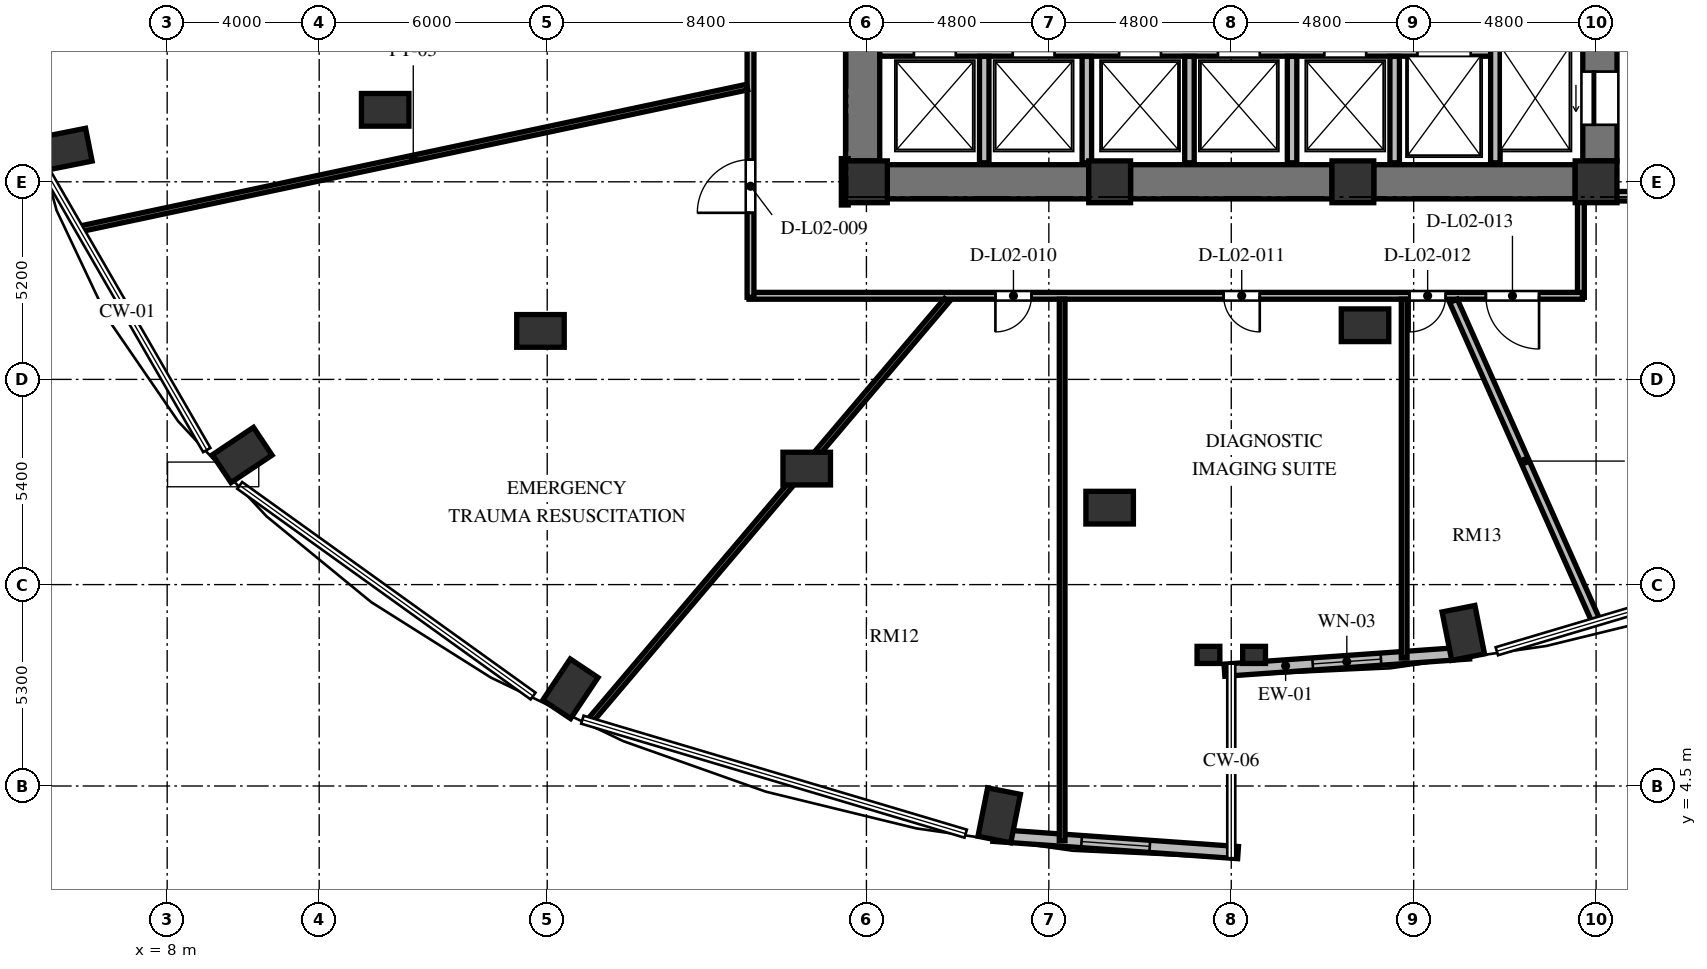
"""IFC4 building model, lengths in metres.
Left out: names, types, materials, properties, quantities, classifications, styles, units other than length and angle.
Written with IfcOpenShell. Run it as: python <this file> out.ifc"""

import sys

from ifc_helpers import new_model, si_unit, direction, frame, frame_2d, origin, origin_2d, place, context, subcontext, project, spatial, rectangle, extrude, element, fill, save


model = new_model("IFC4")
c1 = context("Model", 3, precision=1e-05, world=origin(), true_north=direction((0.0, 1.0)))
c2 = subcontext(c1, "Body", "Model", "MODEL_VIEW")
j1 = project(units=[si_unit("LENGTHUNIT", "METRE"), si_unit("PLANEANGLEUNIT", "RADIAN")], contexts=[c1])
p1 = place(None, origin())
s1 = spatial("IfcSite", under=j1, at=p1, CompositionType="ELEMENT")
p2 = place(p1, origin())
s2 = spatial("IfcBuilding", under=s1, at=p2, CompositionType="ELEMENT")
p3 = place(p2, frame((0.0, 0.0, 10.8)))
s3 = spatial("IfcBuildingStorey", under=s2, at=p3, CompositionType="ELEMENT", Elevation=10.8)
for number, where, z_axis, x_axis in (
    (1, (42.106, 8.529, 0.0), (0.0, 0.0, 1.0), (0.195, -0.981, 0.0)),
    (2, (5.302, 21.25, 0.0), (0.0, 0.0, 1.0), (-0.981, -0.195, 0.0)),
    (3, (9.975, 13.211, 0.0), (0.0, 0.0, 1.0), (-0.831, -0.556, 0.0)),
    (4, (18.611, 7.058, 0.0), (0.0, 0.0, 1.0), (-0.556, -0.831, 0.0)),
    (5, (29.894, 3.729, 0.0), (0.0, 0.0, 1.0), (-0.195, -0.981, 0.0)),
):
    element("IfcColumn", number, at=place(p3, frame(where, z_axis=z_axis, x_axis=x_axis)), inside=s3, PredefinedType="COLUMN", context=c2, shape_type="SweptSolid", body=[
        extrude(rectangle(XDim=1.3, YDim=0.88, at=origin_2d()), origin(), (0.0, 0.0, 1.0), 4.8),
    ])
for number, where, z_axis, x_axis in (
    (6, (26.4, 20.4, 0.0), (0.0, 0.0, 1.0), (1.0, 0.0, 0.0)),
    (7, (32.8, 20.4, 0.0), (0.0, 0.0, 1.0), (1.0, 0.0, 0.0)),
    (8, (39.2, 20.4, 0.0), (0.0, 0.0, 1.0), (1.0, 0.0, 0.0)),
    (9, (45.6, 20.4, 0.0), (0.0, 0.0, 1.0), (1.0, 0.0, 0.0)),
):
    element("IfcColumn", number, at=place(p3, frame(where, z_axis=z_axis, x_axis=x_axis)), inside=s3, PredefinedType="COLUMN", context=c2, shape_type="SweptSolid", body=[
        extrude(rectangle(XDim=1.1, YDim=1.1, at=origin_2d()), origin(), (0.0, 0.0, 1.0), 4.8),
    ])
for number, where, z_axis, x_axis in (
    (10, (39.52, 16.625, 0.0), (0.0, 0.0, 1.0), (1.0, 0.0, 0.0)),
    (11, (13.737, 22.294, 0.0), (0.0, 0.0, 1.0), (1.0, 0.0, 0.0)),
    (12, (17.823, 16.476, 0.0), (0.0, 0.0, 1.0), (1.0, 0.0, 0.0)),
    (13, (24.829, 12.853, 0.0), (0.0, 0.0, 1.0), (1.0, 0.0, 0.0)),
    (14, (32.8, 11.825, 0.0), (0.0, 0.0, 1.0), (1.0, 0.0, 0.0)),
):
    element("IfcColumn", number, at=place(p3, frame(where, z_axis=z_axis, x_axis=x_axis)), inside=s3, PredefinedType="COLUMN", context=c2, shape_type="SweptSolid", body=[
        extrude(rectangle(XDim=1.25, YDim=0.86, at=origin_2d()), origin(), (0.0, 0.0, 1.0), 4.8),
    ])
for number, where, z_axis, x_axis in (
    (15, (35.4, 7.95, 0.0), (0.0, 0.0, 1.0), (1.0, 0.0, 0.0)),
    (16, (36.6, 7.95, 0.0), (0.0, 0.0, 1.0), (1.0, 0.0, 0.0)),
):
    element("IfcColumn", number, at=place(p3, frame(where, z_axis=z_axis, x_axis=x_axis)), inside=s3, PredefinedType="PILASTER", context=c2, shape_type="SweptSolid", body=[
        extrude(rectangle(XDim=0.6, YDim=0.45, at=origin_2d()), origin(), (0.0, 0.0, 1.0), 4.8),
    ])
p4 = place(p3, frame((26.3, 20.95, 0.0), z_axis=(0.0, 0.0, 1.0), x_axis=(0.0, 1.0, 0.0)))
e17 = element("IfcWall", 17, at=p4, inside=s3, PredefinedType="SHEAR", context=c2, shape_type="SweptSolid", body=[
    extrude(rectangle(XDim=14.1, YDim=0.9, at=frame_2d((7.05, 0.0))), origin(), (0.0, 0.0, 1.0), 4.8),
])
p5 = place(p4, frame((6.5, 0.0, 0.0)))
e18 = element("IfcOpeningElement", 18, at=p5, cuts=e17, PredefinedType="OPENING", context=c2, shape_type="SweptSolid", body=[
    extrude(rectangle(XDim=1.2, YDim=2.15, at=frame_2d((0.6, 1.075))), frame((0.0, 0.46, 0.0), z_axis=(0.0, -1.0, 0.0), x_axis=(1.0, 0.0, 0.0)), (0.0, 0.0, 1.0), 0.92),
])
p6 = place(p4, frame((9.6, 0.0, 0.0)))
e19 = element("IfcOpeningElement", 19, at=p6, cuts=e17, PredefinedType="OPENING", context=c2, shape_type="SweptSolid", body=[
    extrude(rectangle(XDim=1.3, YDim=2.2, at=frame_2d((0.65, 1.1))), frame((0.0, 0.46, 0.0), z_axis=(0.0, -1.0, 0.0), x_axis=(1.0, 0.0, 0.0)), (0.0, 0.0, 1.0), 0.92),
])
p7 = place(p4, frame((3.26, 0.0, 0.0)))
e20 = element("IfcOpeningElement", 20, at=p7, cuts=e17, PredefinedType="OPENING", context=c2, shape_type="SweptSolid", body=[
    extrude(rectangle(XDim=1.3, YDim=2.2, at=frame_2d((0.65, 1.1))), frame((0.0, 0.46, 0.0), z_axis=(0.0, -1.0, 0.0), x_axis=(1.0, 0.0, 0.0)), (0.0, 0.0, 1.0), 0.92),
])
p8 = place(p3, frame((45.7, 20.95, 0.0), z_axis=(0.0, 0.0, 1.0), x_axis=(0.0, 1.0, 0.0)))
e21 = element("IfcWall", 21, at=p8, inside=s3, PredefinedType="SHEAR", context=c2, shape_type="SweptSolid", body=[
    extrude(rectangle(XDim=14.1, YDim=0.9, at=frame_2d((7.05, 0.0))), origin(), (0.0, 0.0, 1.0), 4.8),
])
p9 = place(p8, frame((11.75, 0.0, 0.0)))
e22 = element("IfcOpeningElement", 22, at=p9, cuts=e21, PredefinedType="OPENING", context=c2, shape_type="SweptSolid", body=[
    extrude(rectangle(XDim=1.4, YDim=2.3, at=frame_2d((0.7, 1.15))), frame((0.0, 0.46, 0.0), z_axis=(0.0, -1.0, 0.0), x_axis=(1.0, 0.0, 0.0)), (0.0, 0.0, 1.0), 0.92),
])
p10 = place(p8, frame((0.95, 0.0, 0.0)))
e23 = element("IfcOpeningElement", 23, at=p10, cuts=e21, PredefinedType="OPENING", context=c2, shape_type="SweptSolid", body=[
    extrude(rectangle(XDim=1.4, YDim=2.3, at=frame_2d((0.7, 1.15))), frame((0.0, 0.46, 0.0), z_axis=(0.0, -1.0, 0.0), x_axis=(1.0, 0.0, 0.0)), (0.0, 0.0, 1.0), 0.92),
])
p11 = place(p3, frame((26.95, 20.4, 0.0), z_axis=(0.0, 0.0, 1.0), x_axis=(1.0, 0.0, 0.0)))
e24 = element("IfcWall", 24, at=p11, inside=s3, PredefinedType="SHEAR", context=c2, shape_type="SweptSolid", body=[
    extrude(rectangle(XDim=5.3, YDim=0.9, at=frame_2d((2.65, 0.0))), origin(), (0.0, 0.0, 1.0), 4.8),
])
p12 = place(p3, frame((33.35, 20.4, 0.0), z_axis=(0.0, 0.0, 1.0), x_axis=(1.0, 0.0, 0.0)))
e25 = element("IfcWall", 25, at=p12, inside=s3, PredefinedType="SHEAR", context=c2, shape_type="SweptSolid", body=[
    extrude(rectangle(XDim=5.3, YDim=0.9, at=frame_2d((2.65, 0.0))), origin(), (0.0, 0.0, 1.0), 4.8),
])
p13 = place(p3, frame((39.75, 20.4, 0.0), z_axis=(0.0, 0.0, 1.0), x_axis=(1.0, 0.0, 0.0)))
e26 = element("IfcWall", 26, at=p13, inside=s3, PredefinedType="SHEAR", context=c2, shape_type="SweptSolid", body=[
    extrude(rectangle(XDim=5.3, YDim=0.9, at=frame_2d((2.65, 0.0))), origin(), (0.0, 0.0, 1.0), 4.8),
])
p14 = place(p3, frame((35.82, 7.547, 0.0), z_axis=(0.0, 0.0, 1.0), x_axis=(0.99751367159, 0.070473221795, 0.0)))
e27 = element("IfcWall", 27, at=p14, inside=s3, PredefinedType="SOLIDWALL", context=c2, shape_type="SweptSolid", body=[
    extrude(rectangle(XDim=6.458, YDim=0.32, at=frame_2d((3.229, 0.0))), origin(), (0.0, 0.0, 1.0), 4.52),
])
p15 = place(p14, frame((2.329, 0.0, 0.85)))
e28 = element("IfcOpeningElement", 28, at=p15, cuts=e27, PredefinedType="OPENING", context=c2, shape_type="SweptSolid", body=[
    extrude(rectangle(XDim=1.8, YDim=2.4, at=frame_2d((0.9, 1.2))), frame((0.0, 0.17, 0.0), z_axis=(0.0, -1.0, 0.0), x_axis=(1.0, 0.0, 0.0)), (0.0, 0.0, 1.0), 0.34),
])
p16 = place(p3, frame((29.738, 3.202, 0.0), z_axis=(0.0, 0.0, 1.0), x_axis=(0.997513108184, -0.070481196075, 0.0)))
e29 = element("IfcWall", 29, at=p16, inside=s3, PredefinedType="SOLIDWALL", context=c2, shape_type="SweptSolid", body=[
    extrude(rectangle(XDim=6.457, YDim=0.32, at=frame_2d((3.229, 0.0))), origin(), (0.0, 0.0, 1.0), 4.52),
])
p17 = place(p16, frame((2.328, 0.0, 0.85)))
e30 = element("IfcOpeningElement", 30, at=p17, cuts=e29, PredefinedType="OPENING", context=c2, shape_type="SweptSolid", body=[
    extrude(rectangle(XDim=1.8, YDim=2.4, at=frame_2d((0.9, 1.2))), frame((0.0, 0.17, 0.0), z_axis=(0.0, -1.0, 0.0), x_axis=(1.0, 0.0, 0.0)), (0.0, 0.0, 1.0), 0.34),
])
p18 = place(p3, frame((26.75, 23.83, 0.0), z_axis=(0.0, 0.0, 1.0), x_axis=(1.0, 0.0, 0.0)))
e31 = element("IfcWall", 31, at=p18, inside=s3, PredefinedType="SOLIDWALL", context=c2, shape_type="SweptSolid", body=[
    extrude(rectangle(XDim=16.2, YDim=0.25, at=frame_2d((8.1, 0.0))), origin(), (0.0, 0.0, 1.0), 4.52),
])
p19 = place(p18, frame((0.9, 0.0, 0.0)))
e32 = element("IfcOpeningElement", 32, at=p19, cuts=e31, PredefinedType="OPENING", context=c2, shape_type="SweptSolid", body=[
    extrude(rectangle(XDim=1.1, YDim=2.2, at=frame_2d((0.55, 1.1))), frame((0.0, 0.135, 0.0), z_axis=(0.0, -1.0, 0.0), x_axis=(1.0, 0.0, 0.0)), (0.0, 0.0, 1.0), 0.27),
])
p20 = place(p18, frame((3.5, 0.0, 0.0)))
e33 = element("IfcOpeningElement", 33, at=p20, cuts=e31, PredefinedType="OPENING", context=c2, shape_type="SweptSolid", body=[
    extrude(rectangle(XDim=1.1, YDim=2.2, at=frame_2d((0.55, 1.1))), frame((0.0, 0.135, 0.0), z_axis=(0.0, -1.0, 0.0), x_axis=(1.0, 0.0, 0.0)), (0.0, 0.0, 1.0), 0.27),
])
p21 = place(p18, frame((6.3, 0.0, 0.0)))
e34 = element("IfcOpeningElement", 34, at=p21, cuts=e31, PredefinedType="OPENING", context=c2, shape_type="SweptSolid", body=[
    extrude(rectangle(XDim=1.1, YDim=2.2, at=frame_2d((0.55, 1.1))), frame((0.0, 0.135, 0.0), z_axis=(0.0, -1.0, 0.0), x_axis=(1.0, 0.0, 0.0)), (0.0, 0.0, 1.0), 0.27),
])
p22 = place(p18, frame((8.9, 0.0, 0.0)))
e35 = element("IfcOpeningElement", 35, at=p22, cuts=e31, PredefinedType="OPENING", context=c2, shape_type="SweptSolid", body=[
    extrude(rectangle(XDim=1.1, YDim=2.2, at=frame_2d((0.55, 1.1))), frame((0.0, 0.135, 0.0), z_axis=(0.0, -1.0, 0.0), x_axis=(1.0, 0.0, 0.0)), (0.0, 0.0, 1.0), 0.27),
])
p23 = place(p18, frame((11.7, 0.0, 0.0)))
e36 = element("IfcOpeningElement", 36, at=p23, cuts=e31, PredefinedType="OPENING", context=c2, shape_type="SweptSolid", body=[
    extrude(rectangle(XDim=1.1, YDim=2.2, at=frame_2d((0.55, 1.1))), frame((0.0, 0.135, 0.0), z_axis=(0.0, -1.0, 0.0), x_axis=(1.0, 0.0, 0.0)), (0.0, 0.0, 1.0), 0.27),
])
p24 = place(p18, frame((14.15, 0.0, 0.0)))
e37 = element("IfcOpeningElement", 37, at=p24, cuts=e31, PredefinedType="OPENING", context=c2, shape_type="SweptSolid", body=[
    extrude(rectangle(XDim=1.4, YDim=2.3, at=frame_2d((0.7, 1.15))), frame((0.0, 0.135, 0.0), z_axis=(0.0, -1.0, 0.0), x_axis=(1.0, 0.0, 0.0)), (0.0, 0.0, 1.0), 0.27),
])
p25 = place(p3, frame((42.95, 20.9, 0.0), z_axis=(0.0, 0.0, 1.0), x_axis=(0.0, 1.0, 0.0)))
e38 = element("IfcWall", 38, at=p25, inside=s3, PredefinedType="SOLIDWALL", context=c2, shape_type="SweptSolid", body=[
    extrude(rectangle(XDim=3.2, YDim=0.25, at=frame_2d((1.6, 0.0))), origin(), (0.0, 0.0, 1.0), 4.52),
])
for number, where, z_axis, x_axis in (
    (39, (29.5, 20.9, 0.0), (0.0, 0.0, 1.0), (0.0, 1.0, 0.0)),
    (40, (32.2, 20.9, 0.0), (0.0, 0.0, 1.0), (0.0, 1.0, 0.0)),
    (41, (34.9, 20.9, 0.0), (0.0, 0.0, 1.0), (0.0, 1.0, 0.0)),
    (42, (37.6, 20.9, 0.0), (0.0, 0.0, 1.0), (0.0, 1.0, 0.0)),
    (43, (40.3, 20.9, 0.0), (0.0, 0.0, 1.0), (0.0, 1.0, 0.0)),
):
    element("IfcWall", number, at=place(p3, frame(where, z_axis=z_axis, x_axis=x_axis)), inside=s3, PredefinedType="SOLIDWALL", context=c2, shape_type="SweptSolid", body=[
        extrude(rectangle(XDim=2.8, YDim=0.25, at=frame_2d((1.4, 0.0))), origin(), (0.0, 0.0, 1.0), 4.52),
    ])
p26 = place(p3, frame((45.7, 20.02, 0.0), z_axis=(0.0, 0.0, 1.0), x_axis=(1.0, 0.0, 0.0)))
e44 = element("IfcWall", 44, at=p26, inside=s3, PredefinedType="SOLIDWALL", context=c2, shape_type="SweptSolid", body=[
    extrude(rectangle(XDim=4.715, YDim=0.25, at=frame_2d((2.357, 0.0))), origin(), (0.0, 0.0, 1.0), 4.52),
])
p27 = place(p3, frame((25.83, 21.01, 0.0), z_axis=(0.0, 0.0, 1.0), x_axis=(0.0, -1.0, 0.0)))
e45 = element("IfcWall", 45, at=p27, inside=s3, PredefinedType="PARTITIONING", context=c2, shape_type="SweptSolid", body=[
    extrude(rectangle(XDim=1.22, YDim=0.18, at=frame_2d((0.61, 0.0))), origin(), (0.0, 0.0, 1.0), 4.52),
])
p28 = place(p3, frame((45.2, 19.91, 0.0), z_axis=(0.0, 0.0, 1.0), x_axis=(0.0, -1.0, 0.0)))
e46 = element("IfcWall", 46, at=p28, inside=s3, PredefinedType="PARTITIONING", context=c2, shape_type="SweptSolid", body=[
    extrude(rectangle(XDim=2.55, YDim=0.18, at=frame_2d((1.275, 0.0))), origin(), (0.0, 0.0, 1.0), 4.52),
])
p29 = place(p3, frame((45.24, 17.4, 0.0), z_axis=(0.0, 0.0, 1.0), x_axis=(-1.0, 0.0, 0.0)))
e47 = element("IfcWall", 47, at=p29, inside=s3, PredefinedType="PARTITIONING", context=c2, shape_type="SweptSolid", body=[
    extrude(rectangle(XDim=21.93, YDim=0.18, at=frame_2d((10.965, 0.0))), origin(), (0.0, 0.0, 1.0), 4.52),
])
p30 = place(p29, frame((14.496, 0.0, 0.0)))
e48 = element("IfcOpeningElement", 48, at=p30, cuts=e47, PredefinedType="OPENING", context=c2, shape_type="SweptSolid", body=[
    extrude(rectangle(XDim=0.95, YDim=2.1, at=frame_2d((0.475, 1.05))), frame((0.0, 0.1, 0.0), z_axis=(0.0, -1.0, 0.0), x_axis=(1.0, 0.0, 0.0)), (0.0, 0.0, 1.0), 0.2),
])
p31 = place(p29, frame((8.49, 0.0, 0.0)))
e49 = element("IfcOpeningElement", 49, at=p31, cuts=e47, PredefinedType="OPENING", context=c2, shape_type="SweptSolid", body=[
    extrude(rectangle(XDim=0.95, YDim=2.1, at=frame_2d((0.475, 1.05))), frame((0.0, 0.1, 0.0), z_axis=(0.0, -1.0, 0.0), x_axis=(1.0, 0.0, 0.0)), (0.0, 0.0, 1.0), 0.2),
])
p32 = place(p29, frame((3.597, 0.0, 0.0)))
e50 = element("IfcOpeningElement", 50, at=p32, cuts=e47, PredefinedType="OPENING", context=c2, shape_type="SweptSolid", body=[
    extrude(rectangle(XDim=0.95, YDim=2.1, at=frame_2d((0.475, 1.05))), frame((0.0, 0.1, 0.0), z_axis=(0.0, -1.0, 0.0), x_axis=(1.0, 0.0, 0.0)), (0.0, 0.0, 1.0), 0.2),
])
p33 = place(p29, frame((1.141, 0.0, 0.0)))
e51 = element("IfcOpeningElement", 51, at=p33, cuts=e47, PredefinedType="OPENING", context=c2, shape_type="SweptSolid", body=[
    extrude(rectangle(XDim=1.4, YDim=2.2, at=frame_2d((0.7, 1.1))), frame((0.0, 0.1, 0.0), z_axis=(0.0, -1.0, 0.0), x_axis=(1.0, 0.0, 0.0)), (0.0, 0.0, 1.0), 0.2),
])
p34 = place(p3, frame((23.35, 17.36, 0.0), z_axis=(0.0, 0.0, 1.0), x_axis=(0.0, 1.0, 0.0)))
e52 = element("IfcWall", 52, at=p34, inside=s3, PredefinedType="PARTITIONING", context=c2, shape_type="SweptSolid", body=[
    extrude(rectangle(XDim=9.28, YDim=0.18, at=frame_2d((4.64, 0.0))), origin(), (0.0, 0.0, 1.0), 4.52),
])
p35 = place(p34, frame((2.224, 0.0, 0.0)))
e53 = element("IfcOpeningElement", 53, at=p35, cuts=e52, PredefinedType="OPENING", context=c2, shape_type="SweptSolid", body=[
    extrude(rectangle(XDim=1.4, YDim=2.2, at=frame_2d((0.7, 1.1))), frame((0.0, 0.1, 0.0), z_axis=(0.0, -1.0, 0.0), x_axis=(1.0, 0.0, 0.0)), (0.0, 0.0, 1.0), 0.2),
])
p36 = place(p3, frame((41.847, 17.267, 0.0), z_axis=(0.0, 0.0, 1.0), x_axis=(0.406746917765, -0.913540882987, 0.0)))
e54 = element("IfcWall", 54, at=p36, inside=s3, PredefinedType="PARTITIONING", context=c2, shape_type="SweptSolid", body=[
    extrude(rectangle(XDim=9.231, YDim=0.22, at=frame_2d((4.616, 0.0))), origin(), (0.0, 0.0, 1.0), 4.52),
])
p37 = place(p3, frame((23.261, 22.892, 0.0), z_axis=(0.0, 0.0, 1.0), x_axis=(-0.978149523722, -0.207902643662, 0.0)))
e55 = element("IfcWall", 55, at=p37, inside=s3, PredefinedType="PARTITIONING", context=c2, shape_type="SweptSolid", body=[
    extrude(rectangle(XDim=17.963, YDim=0.15, at=frame_2d((8.982, 0.0))), origin(), (0.0, 0.0, 1.0), 4.52),
])
p38 = place(p3, frame((28.513, 17.279, 0.0), z_axis=(0.0, 0.0, 1.0), x_axis=(-0.646855904645, -0.762612246575, 0.0)))
e56 = element("IfcWall", 56, at=p38, inside=s3, PredefinedType="PARTITIONING", context=c2, shape_type="SweptSolid", body=[
    extrude(rectangle(XDim=14.546, YDim=0.15, at=frame_2d((7.273, 0.0))), origin(), (0.0, 0.0, 1.0), 3.805),
])
p39 = place(p3, frame((31.55, 3.06, 0.0), z_axis=(0.0, 0.0, 1.0), x_axis=(0.0, 1.0, 0.0)))
e57 = element("IfcWall", 57, at=p39, inside=s3, PredefinedType="PARTITIONING", context=c2, shape_type="SweptSolid", body=[
    extrude(rectangle(XDim=14.25, YDim=0.15, at=frame_2d((7.125, 0.0))), origin(), (0.0, 0.0, 1.0), 4.52),
])
p40 = place(p3, frame((40.55, 7.866, 0.0), z_axis=(0.0, 0.0, 1.0), x_axis=(0.0, 1.0, 0.0)))
e58 = element("IfcWall", 58, at=p40, inside=s3, PredefinedType="PARTITIONING", context=c2, shape_type="SweptSolid", body=[
    extrude(rectangle(XDim=9.444, YDim=0.15, at=frame_2d((4.722, 0.0))), origin(), (0.0, 0.0, 1.0), 4.52),
])
p41 = place(p15, origin())
e59 = element("IfcWindow", 59, at=p41, inside=s3, PartitioningType="SINGLE_PANEL", PredefinedType="WINDOW", context=c2, shape_type="SweptSolid", body=[
    extrude(rectangle(XDim=1.8, YDim=2.4, at=frame_2d((0.9, 1.2))), frame((0.0, 0.03, 0.0), z_axis=(0.0, -1.0, 0.0), x_axis=(1.0, 0.0, 0.0)), (0.0, 0.0, 1.0), 0.06),
])
fill(e28, e59)
p42 = place(p17, origin())
e60 = element("IfcWindow", 60, at=p42, inside=s3, PartitioningType="SINGLE_PANEL", PredefinedType="WINDOW", context=c2, shape_type="SweptSolid", body=[
    extrude(rectangle(XDim=1.8, YDim=2.4, at=frame_2d((0.9, 1.2))), frame((0.0, 0.03, 0.0), z_axis=(0.0, -1.0, 0.0), x_axis=(1.0, 0.0, 0.0)), (0.0, 0.0, 1.0), 0.06),
])
fill(e30, e60)
p43 = place(p10, origin())
e61 = element("IfcDoor", 61, at=p43, inside=s3, OperationType="SLIDING_TO_LEFT", PredefinedType="DOOR", context=c2, shape_type="SweptSolid", body=[
    extrude(rectangle(XDim=1.4, YDim=2.3, at=frame_2d((0.7, 1.15))), frame((0.0, 0.025, 0.0), z_axis=(0.0, -1.0, 0.0), x_axis=(1.0, 0.0, 0.0)), (0.0, 0.0, 1.0), 0.05),
])
fill(e23, e61)
p44 = place(p35, origin())
e62 = element("IfcDoor", 62, at=p44, inside=s3, OperationType="SINGLE_SWING_LEFT", PredefinedType="DOOR", context=c2, shape_type="SweptSolid", body=[
    extrude(rectangle(XDim=1.4, YDim=2.2, at=frame_2d((0.7, 1.1))), frame((0.0, 0.025, 0.0), z_axis=(0.0, -1.0, 0.0), x_axis=(1.0, 0.0, 0.0)), (0.0, 0.0, 1.0), 0.05),
])
fill(e53, e62)
p45 = place(p30, origin())
e63 = element("IfcDoor", 63, at=p45, inside=s3, OperationType="SINGLE_SWING_RIGHT", PredefinedType="DOOR", context=c2, shape_type="SweptSolid", body=[
    extrude(rectangle(XDim=0.95, YDim=2.1, at=frame_2d((0.475, 1.05))), frame((0.0, 0.025, 0.0), z_axis=(0.0, -1.0, 0.0), x_axis=(1.0, 0.0, 0.0)), (0.0, 0.0, 1.0), 0.05),
])
fill(e48, e63)
p46 = place(p31, origin())
e64 = element("IfcDoor", 64, at=p46, inside=s3, OperationType="SINGLE_SWING_LEFT", PredefinedType="DOOR", context=c2, shape_type="SweptSolid", body=[
    extrude(rectangle(XDim=0.95, YDim=2.1, at=frame_2d((0.475, 1.05))), frame((0.0, 0.025, 0.0), z_axis=(0.0, -1.0, 0.0), x_axis=(1.0, 0.0, 0.0)), (0.0, 0.0, 1.0), 0.05),
])
fill(e49, e64)
p47 = place(p32, origin())
e65 = element("IfcDoor", 65, at=p47, inside=s3, OperationType="SINGLE_SWING_RIGHT", PredefinedType="DOOR", context=c2, shape_type="SweptSolid", body=[
    extrude(rectangle(XDim=0.95, YDim=2.1, at=frame_2d((0.475, 1.05))), frame((0.0, 0.025, 0.0), z_axis=(0.0, -1.0, 0.0), x_axis=(1.0, 0.0, 0.0)), (0.0, 0.0, 1.0), 0.05),
])
fill(e50, e65)
p48 = place(p33, origin())
e66 = element("IfcDoor", 66, at=p48, inside=s3, OperationType="SINGLE_SWING_LEFT", PredefinedType="DOOR", context=c2, shape_type="SweptSolid", body=[
    extrude(rectangle(XDim=1.4, YDim=2.2, at=frame_2d((0.7, 1.1))), frame((0.0, 0.025, 0.0), z_axis=(0.0, -1.0, 0.0), x_axis=(1.0, 0.0, 0.0)), (0.0, 0.0, 1.0), 0.05),
])
fill(e51, e66)
save(model, sys.argv[1])
